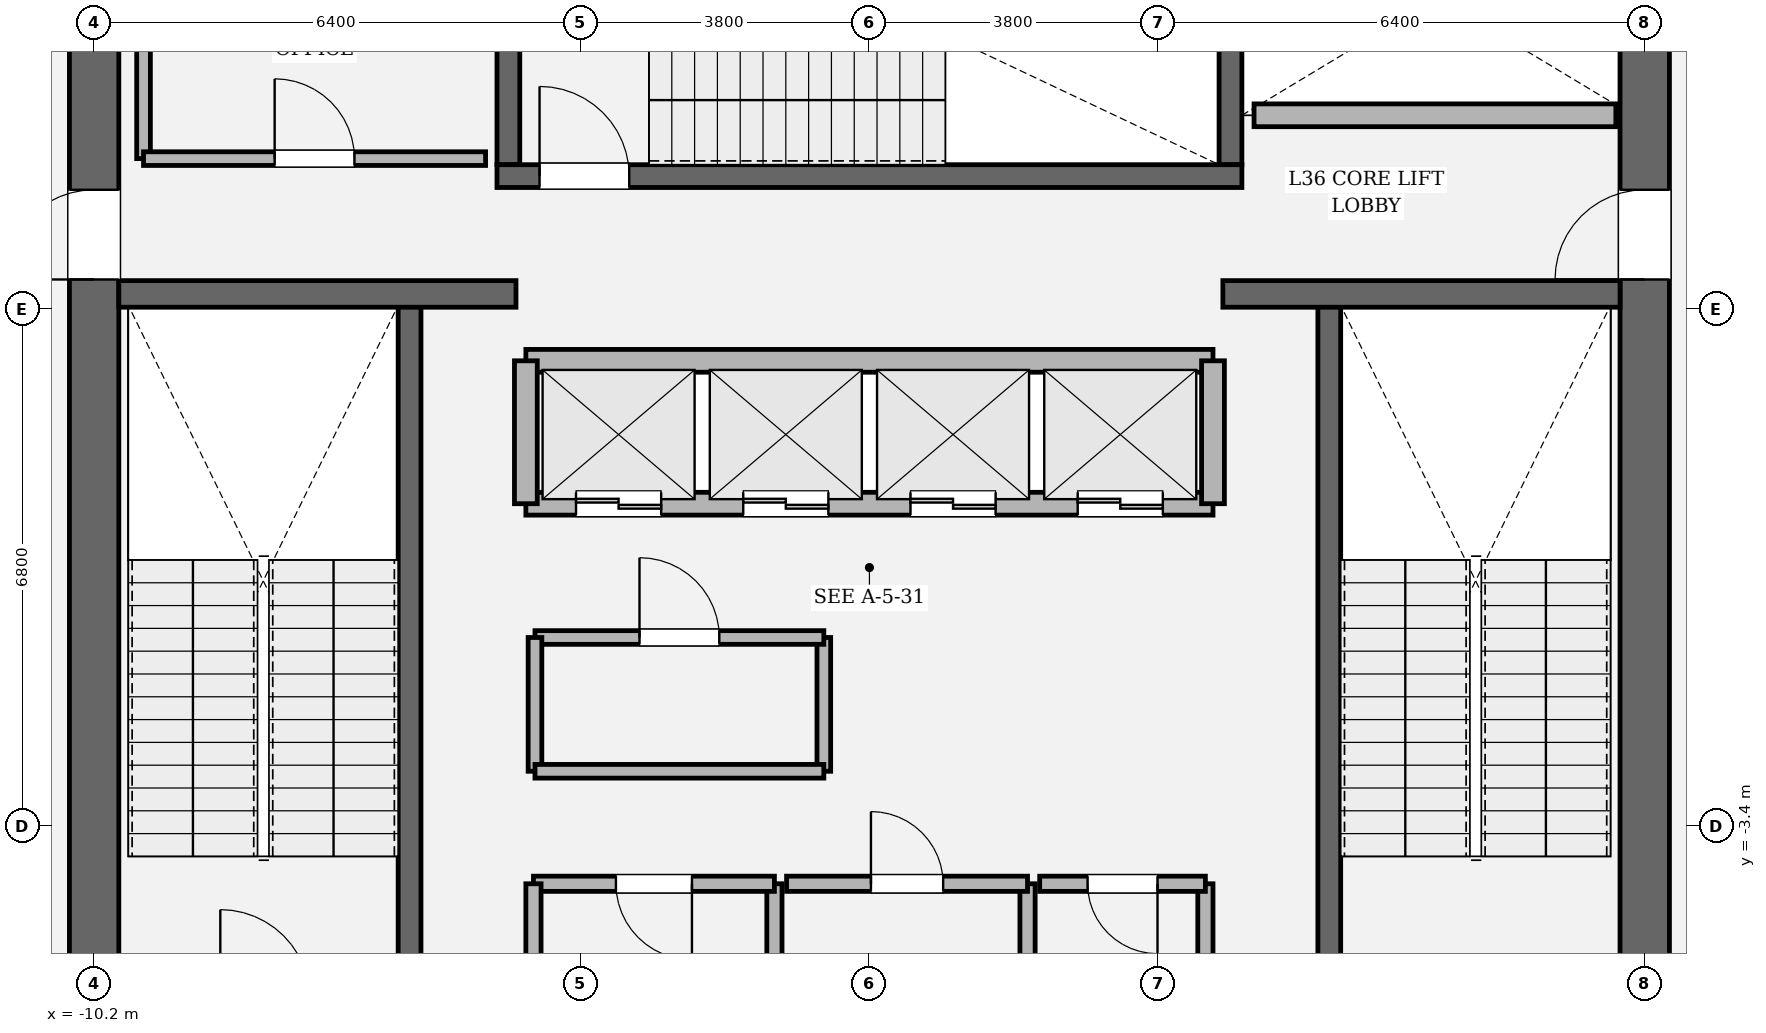
"""IFC4 building model, lengths in metres.
Left out: names, types, materials, properties, quantities, classifications, styles, units other than length and angle.
Written with IfcOpenShell. Run it as: python <this file> out.ifc"""

import sys

from ifc_helpers import new_model, si_unit, direction, frame, frame_2d, origin, place, context, subcontext, project, spatial, rectangle, extrude, element, fill, save


model = new_model("IFC4")
c1 = context("Model", 3, precision=1e-05, world=origin(), true_north=direction((0.0, 1.0)))
c2 = subcontext(c1, "Body", "Model", "MODEL_VIEW")
j1 = project(units=[si_unit("LENGTHUNIT", "METRE"), si_unit("PLANEANGLEUNIT", "RADIAN")], contexts=[c1])
p1 = place(None, origin())
s1 = spatial("IfcSite", under=j1, at=p1, CompositionType="ELEMENT")
p2 = place(p1, origin())
s2 = spatial("IfcBuilding", under=s1, at=p2, CompositionType="ELEMENT")
p3 = place(p2, frame((0.0, 0.0, 156.0)))
s3 = spatial("IfcBuildingStorey", under=s2, at=p3, CompositionType="ELEMENT", Elevation=156.0)
p4 = place(p3, frame((-10.2, -8.875, 0.0), z_axis=(0.0, 0.0, 1.0), x_axis=(0.0, 1.0, 0.0)))
e1 = element("IfcWall", 1, at=p4, inside=s3, PredefinedType="SHEAR", context=c2, shape_type="SweptSolid", body=[
    extrude(rectangle(XDim=17.75, YDim=0.65, at=frame_2d((8.875, 0.0))), origin(), (0.0, 0.0, 1.0), 4.05),
])
p5 = place(p4, frame((12.665, 0.0, 0.0)))
e2 = element("IfcOpeningElement", 2, at=p5, cuts=e1, PredefinedType="OPENING", context=c2, shape_type="SweptSolid", body=[
    extrude(rectangle(XDim=1.18, YDim=2.2, at=frame_2d((0.59, 1.1))), frame((0.0, 0.335, 0.0), z_axis=(0.0, -1.0, 0.0), x_axis=(1.0, 0.0, 0.0)), (0.0, 0.0, 1.0), 0.67),
])
p6 = place(p3, frame((10.2, 8.875, 0.0), z_axis=(0.0, 0.0, 1.0), x_axis=(0.0, -1.0, 0.0)))
e3 = element("IfcWall", 3, at=p6, inside=s3, PredefinedType="SHEAR", context=c2, shape_type="SweptSolid", body=[
    extrude(rectangle(XDim=17.75, YDim=0.65, at=frame_2d((8.875, 0.0))), origin(), (0.0, 0.0, 1.0), 4.05),
])
p7 = place(p6, frame((3.905, 0.0, 0.0)))
e4 = element("IfcOpeningElement", 4, at=p7, cuts=e3, PredefinedType="OPENING", context=c2, shape_type="SweptSolid", body=[
    extrude(rectangle(XDim=1.18, YDim=2.2, at=frame_2d((0.59, 1.1))), frame((0.0, 0.335, 0.0), z_axis=(0.0, -1.0, 0.0), x_axis=(1.0, 0.0, 0.0)), (0.0, 0.0, 1.0), 0.67),
])
for number, where, z_axis, x_axis in (
    (5, (-6.05, -5.5, 0.0), (0.0, 0.0, 1.0), (0.0, 1.0, 0.0)),
    (6, (6.05, 3.45, 0.0), (0.0, 0.0, 1.0), (0.0, -1.0, 0.0)),
):
    element("IfcWall", number, at=place(p3, frame(where, z_axis=z_axis, x_axis=x_axis)), inside=s3, PredefinedType="SOLIDWALL", context=c2, shape_type="SweptSolid", body=[
        extrude(rectangle(XDim=8.95, YDim=0.3, at=frame_2d((4.475, 0.0))), origin(), (0.0, 0.0, 1.0), 4.05),
    ])
for number, where, z_axis, x_axis in (
    (7, (-4.75, 5.3, 0.0), (0.0, 0.0, 1.0), (0.0, 1.0, 0.0)),
    (8, (4.75, 8.875, 0.0), (0.0, 0.0, 1.0), (0.0, -1.0, 0.0)),
):
    element("IfcWall", number, at=place(p3, frame(where, z_axis=z_axis, x_axis=x_axis)), inside=s3, PredefinedType="SOLIDWALL", context=c2, shape_type="SweptSolid", body=[
        extrude(rectangle(XDim=3.575, YDim=0.3, at=frame_2d((1.788, 0.0))), origin(), (0.0, 0.0, 1.0), 4.05),
    ])
p8 = place(p3, frame((-4.9, 5.15, 0.0), z_axis=(0.0, 0.0, 1.0), x_axis=(1.0, 0.0, 0.0)))
e9 = element("IfcWall", 9, at=p8, inside=s3, PredefinedType="SOLIDWALL", context=c2, shape_type="SweptSolid", body=[
    extrude(rectangle(XDim=9.8, YDim=0.3, at=frame_2d((4.9, 0.0))), origin(), (0.0, 0.0, 1.0), 4.05),
])
p9 = place(p8, frame((0.56, 0.0, 0.0)))
e10 = element("IfcOpeningElement", 10, at=p9, cuts=e9, PredefinedType="OPENING", context=c2, shape_type="SweptSolid", body=[
    extrude(rectangle(XDim=1.18, YDim=2.2, at=frame_2d((0.59, 1.1))), frame((0.0, 0.16, 0.0), z_axis=(0.0, -1.0, 0.0), x_axis=(1.0, 0.0, 0.0)), (0.0, 0.0, 1.0), 0.32),
])
for number, where, z_axis, x_axis in (
    (11, (-9.875, 3.6, 0.0), (0.0, 0.0, 1.0), (1.0, 0.0, 0.0)),
    (12, (4.65, 3.6, 0.0), (0.0, 0.0, 1.0), (1.0, 0.0, 0.0)),
):
    element("IfcWall", number, at=place(p3, frame(where, z_axis=z_axis, x_axis=x_axis)), inside=s3, PredefinedType="SOLIDWALL", context=c2, shape_type="SweptSolid", body=[
        extrude(rectangle(XDim=5.225, YDim=0.35, at=frame_2d((2.613, 0.0))), origin(), (0.0, 0.0, 1.0), 4.05),
    ])
p10 = place(p3, frame((-4.52, 0.84, 0.0), z_axis=(0.0, 0.0, 1.0), x_axis=(1.0, 0.0, 0.0)))
e13 = element("IfcWall", 13, at=p10, inside=s3, PredefinedType="SOLIDWALL", context=c2, shape_type="SweptSolid", body=[
    extrude(rectangle(XDim=9.04, YDim=0.3, at=frame_2d((4.52, 0.0))), origin(), (0.0, 0.0, 1.0), 3.83),
])
p11 = place(p10, frame((0.66, 0.0, 0.0)))
e14 = element("IfcOpeningElement", 14, at=p11, cuts=e13, PredefinedType="OPENING", context=c2, shape_type="SweptSolid", body=[
    extrude(rectangle(XDim=1.12, YDim=2.25, at=frame_2d((0.56, 1.125))), frame((0.0, 0.16, 0.0), z_axis=(0.0, -1.0, 0.0), x_axis=(1.0, 0.0, 0.0)), (0.0, 0.0, 1.0), 0.32),
])
p12 = place(p10, frame((2.86, 0.0, 0.0)))
e15 = element("IfcOpeningElement", 15, at=p12, cuts=e13, PredefinedType="OPENING", context=c2, shape_type="SweptSolid", body=[
    extrude(rectangle(XDim=1.12, YDim=2.25, at=frame_2d((0.56, 1.125))), frame((0.0, 0.16, 0.0), z_axis=(0.0, -1.0, 0.0), x_axis=(1.0, 0.0, 0.0)), (0.0, 0.0, 1.0), 0.32),
])
p13 = place(p10, frame((5.06, 0.0, 0.0)))
e16 = element("IfcOpeningElement", 16, at=p13, cuts=e13, PredefinedType="OPENING", context=c2, shape_type="SweptSolid", body=[
    extrude(rectangle(XDim=1.12, YDim=2.25, at=frame_2d((0.56, 1.125))), frame((0.0, 0.16, 0.0), z_axis=(0.0, -1.0, 0.0), x_axis=(1.0, 0.0, 0.0)), (0.0, 0.0, 1.0), 0.32),
])
p14 = place(p10, frame((7.26, 0.0, 0.0)))
e17 = element("IfcOpeningElement", 17, at=p14, cuts=e13, PredefinedType="OPENING", context=c2, shape_type="SweptSolid", body=[
    extrude(rectangle(XDim=1.12, YDim=2.25, at=frame_2d((0.56, 1.125))), frame((0.0, 0.16, 0.0), z_axis=(0.0, -1.0, 0.0), x_axis=(1.0, 0.0, 0.0)), (0.0, 0.0, 1.0), 0.32),
])
p15 = place(p3, frame((-4.52, 2.72, 0.0), z_axis=(0.0, 0.0, 1.0), x_axis=(1.0, 0.0, 0.0)))
e18 = element("IfcWall", 18, at=p15, inside=s3, PredefinedType="SOLIDWALL", context=c2, shape_type="SweptSolid", body=[
    extrude(rectangle(XDim=9.04, YDim=0.3, at=frame_2d((4.52, 0.0))), origin(), (0.0, 0.0, 1.0), 3.83),
])
for number, where, z_axis, x_axis in (
    (19, (-4.52, 0.84, 0.0), (0.0, 0.0, 1.0), (0.0, 1.0, 0.0)),
    (20, (4.52, 0.84, 0.0), (0.0, 0.0, 1.0), (0.0, 1.0, 0.0)),
):
    element("IfcWall", number, at=place(p3, frame(where, z_axis=z_axis, x_axis=x_axis)), inside=s3, PredefinedType="SOLIDWALL", context=c2, shape_type="SweptSolid", body=[
        extrude(rectangle(XDim=1.88, YDim=0.3, at=frame_2d((0.94, 0.0))), origin(), (0.0, 0.0, 1.0), 3.83),
    ])
p16 = place(p3, frame((5.06, 5.95, 0.0), z_axis=(0.0, 0.0, 1.0), x_axis=(1.0, 0.0, 0.0)))
e21 = element("IfcWall", 21, at=p16, inside=s3, PredefinedType="SOLIDWALL", context=c2, shape_type="SweptSolid", body=[
    extrude(rectangle(XDim=4.76, YDim=0.3, at=frame_2d((2.38, 0.0))), origin(), (0.0, 0.0, 1.0), 3.83),
])
p17 = place(p3, frame((-1.25, -5.9, 0.0), z_axis=(0.0, 0.0, 1.0), x_axis=(0.0, 1.0, 0.0)))
e22 = element("IfcWall", 22, at=p17, inside=s3, PredefinedType="SOLIDWALL", context=c2, shape_type="SweptSolid", body=[
    extrude(rectangle(XDim=1.74, YDim=0.2, at=frame_2d((0.87, 0.0))), origin(), (0.0, 0.0, 1.0), 3.83),
])
p18 = place(p3, frame((-1.25, -4.16, 0.0), z_axis=(0.0, 0.0, 1.0), x_axis=(-1.0, 0.0, 0.0)))
e23 = element("IfcWall", 23, at=p18, inside=s3, PredefinedType="SOLIDWALL", context=c2, shape_type="SweptSolid", body=[
    extrude(rectangle(XDim=3.17, YDim=0.2, at=frame_2d((1.585, 0.0))), origin(), (0.0, 0.0, 1.0), 3.83),
])
p19 = place(p18, frame((1.085, 0.0, 0.0)))
e24 = element("IfcOpeningElement", 24, at=p19, cuts=e23, PredefinedType="OPENING", context=c2, shape_type="SweptSolid", body=[
    extrude(rectangle(XDim=1.0, YDim=2.15, at=frame_2d((0.5, 1.075))), frame((0.0, 0.11, 0.0), z_axis=(0.0, -1.0, 0.0), x_axis=(1.0, 0.0, 0.0)), (0.0, 0.0, 1.0), 0.22),
])
for number, where, z_axis, x_axis in (
    (25, (-4.42, -4.16, 0.0), (0.0, 0.0, 1.0), (0.0, -1.0, 0.0)),
    (26, (2.08, -5.9, 0.0), (0.0, 0.0, 1.0), (0.0, 1.0, 0.0)),
):
    element("IfcWall", number, at=place(p3, frame(where, z_axis=z_axis, x_axis=x_axis)), inside=s3, PredefinedType="SOLIDWALL", context=c2, shape_type="SweptSolid", body=[
        extrude(rectangle(XDim=1.74, YDim=0.2, at=frame_2d((0.87, 0.0))), origin(), (0.0, 0.0, 1.0), 3.83),
    ])
p20 = place(p3, frame((2.08, -4.16, 0.0), z_axis=(0.0, 0.0, 1.0), x_axis=(-1.0, 0.0, 0.0)))
e27 = element("IfcWall", 27, at=p20, inside=s3, PredefinedType="SOLIDWALL", context=c2, shape_type="SweptSolid", body=[
    extrude(rectangle(XDim=3.17, YDim=0.2, at=frame_2d((1.585, 0.0))), origin(), (0.0, 0.0, 1.0), 3.83),
])
p21 = place(p20, frame((1.11, 0.0, 0.0)))
e28 = element("IfcOpeningElement", 28, at=p21, cuts=e27, PredefinedType="OPENING", context=c2, shape_type="SweptSolid", body=[
    extrude(rectangle(XDim=0.95, YDim=2.15, at=frame_2d((0.475, 1.075))), frame((0.0, 0.11, 0.0), z_axis=(0.0, -1.0, 0.0), x_axis=(1.0, 0.0, 0.0)), (0.0, 0.0, 1.0), 0.22),
])
p22 = place(p3, frame((4.42, -5.9, 0.0), z_axis=(0.0, 0.0, 1.0), x_axis=(0.0, 1.0, 0.0)))
e29 = element("IfcWall", 29, at=p22, inside=s3, PredefinedType="SOLIDWALL", context=c2, shape_type="SweptSolid", body=[
    extrude(rectangle(XDim=1.74, YDim=0.2, at=frame_2d((0.87, 0.0))), origin(), (0.0, 0.0, 1.0), 3.83),
])
p23 = place(p3, frame((4.42, -4.16, 0.0), z_axis=(0.0, 0.0, 1.0), x_axis=(-1.0, 0.0, 0.0)))
e30 = element("IfcWall", 30, at=p23, inside=s3, PredefinedType="SOLIDWALL", context=c2, shape_type="SweptSolid", body=[
    extrude(rectangle(XDim=2.18, YDim=0.2, at=frame_2d((1.09, 0.0))), origin(), (0.0, 0.0, 1.0), 3.83),
])
p24 = place(p23, frame((0.63, 0.0, 0.0)))
e31 = element("IfcOpeningElement", 31, at=p24, cuts=e30, PredefinedType="OPENING", context=c2, shape_type="SweptSolid", body=[
    extrude(rectangle(XDim=0.92, YDim=2.1, at=frame_2d((0.46, 1.05))), frame((0.0, 0.11, 0.0), z_axis=(0.0, -1.0, 0.0), x_axis=(1.0, 0.0, 0.0)), (0.0, 0.0, 1.0), 0.22),
])
p25 = place(p3, frame((-0.6, -2.68, 0.0), z_axis=(0.0, 0.0, 1.0), x_axis=(0.0, 1.0, 0.0)))
e32 = element("IfcWall", 32, at=p25, inside=s3, PredefinedType="PARTITIONING", context=c2, shape_type="SweptSolid", body=[
    extrude(rectangle(XDim=1.76, YDim=0.18, at=frame_2d((0.88, 0.0))), origin(), (0.0, 0.0, 1.0), 3.83),
])
p26 = place(p3, frame((-0.6, -0.92, 0.0), z_axis=(0.0, 0.0, 1.0), x_axis=(-1.0, 0.0, 0.0)))
e33 = element("IfcWall", 33, at=p26, inside=s3, PredefinedType="PARTITIONING", context=c2, shape_type="SweptSolid", body=[
    extrude(rectangle(XDim=3.8, YDim=0.18, at=frame_2d((1.9, 0.0))), origin(), (0.0, 0.0, 1.0), 3.83),
])
p27 = place(p26, frame((1.375, 0.0, 0.0)))
e34 = element("IfcOpeningElement", 34, at=p27, cuts=e33, PredefinedType="OPENING", context=c2, shape_type="SweptSolid", body=[
    extrude(rectangle(XDim=1.05, YDim=2.2, at=frame_2d((0.525, 1.1))), frame((0.0, 0.1, 0.0), z_axis=(0.0, -1.0, 0.0), x_axis=(1.0, 0.0, 0.0)), (0.0, 0.0, 1.0), 0.2),
])
p28 = place(p3, frame((-4.4, -0.92, 0.0), z_axis=(0.0, 0.0, 1.0), x_axis=(0.0, -1.0, 0.0)))
e35 = element("IfcWall", 35, at=p28, inside=s3, PredefinedType="PARTITIONING", context=c2, shape_type="SweptSolid", body=[
    extrude(rectangle(XDim=1.76, YDim=0.18, at=frame_2d((0.88, 0.0))), origin(), (0.0, 0.0, 1.0), 3.83),
])
p29 = place(p3, frame((-4.4, -2.68, 0.0), z_axis=(0.0, 0.0, 1.0), x_axis=(1.0, 0.0, 0.0)))
e36 = element("IfcWall", 36, at=p29, inside=s3, PredefinedType="PARTITIONING", context=c2, shape_type="SweptSolid", body=[
    extrude(rectangle(XDim=3.8, YDim=0.18, at=frame_2d((1.9, 0.0))), origin(), (0.0, 0.0, 1.0), 3.83),
])
p30 = place(p3, frame((-9.55, 8.65, 0.0), z_axis=(0.0, 0.0, 1.0), x_axis=(0.0, -1.0, 0.0)))
e37 = element("IfcWall", 37, at=p30, inside=s3, PredefinedType="PARTITIONING", context=c2, shape_type="SweptSolid", body=[
    extrude(rectangle(XDim=3.27, YDim=0.18, at=frame_2d((1.635, 0.0))), origin(), (0.0, 0.0, 1.0), 3.83),
])
p31 = place(p3, frame((-9.55, 5.38, 0.0), z_axis=(0.0, 0.0, 1.0), x_axis=(1.0, 0.0, 0.0)))
e38 = element("IfcWall", 38, at=p31, inside=s3, PredefinedType="PARTITIONING", context=c2, shape_type="SweptSolid", body=[
    extrude(rectangle(XDim=4.5, YDim=0.18, at=frame_2d((2.25, 0.0))), origin(), (0.0, 0.0, 1.0), 3.83),
])
p32 = place(p31, frame((1.725, 0.0, 0.0)))
e39 = element("IfcOpeningElement", 39, at=p32, cuts=e38, PredefinedType="OPENING", context=c2, shape_type="SweptSolid", body=[
    extrude(rectangle(XDim=1.05, YDim=2.2, at=frame_2d((0.525, 1.1))), frame((0.0, 0.1, 0.0), z_axis=(0.0, -1.0, 0.0), x_axis=(1.0, 0.0, 0.0)), (0.0, 0.0, 1.0), 0.2),
])
p33 = place(p9, origin())
e40 = element("IfcDoor", 40, at=p33, inside=s3, OperationType="SINGLE_SWING_LEFT", PredefinedType="DOOR", context=c2, shape_type="SweptSolid", body=[
    extrude(rectangle(XDim=1.18, YDim=2.2, at=frame_2d((0.59, 1.1))), frame((0.0, 0.025, 0.0), z_axis=(0.0, -1.0, 0.0), x_axis=(1.0, 0.0, 0.0)), (0.0, 0.0, 1.0), 0.05),
])
fill(e10, e40)
p34 = place(p5, origin())
e41 = element("IfcDoor", 41, at=p34, inside=s3, OperationType="SINGLE_SWING_LEFT", PredefinedType="DOOR", context=c2, shape_type="SweptSolid", body=[
    extrude(rectangle(XDim=1.18, YDim=2.2, at=frame_2d((0.59, 1.1))), frame((0.0, 0.025, 0.0), z_axis=(0.0, -1.0, 0.0), x_axis=(1.0, 0.0, 0.0)), (0.0, 0.0, 1.0), 0.05),
])
fill(e2, e41)
p35 = place(p7, origin())
e42 = element("IfcDoor", 42, at=p35, inside=s3, OperationType="SINGLE_SWING_RIGHT", PredefinedType="DOOR", context=c2, shape_type="SweptSolid", body=[
    extrude(rectangle(XDim=1.18, YDim=2.2, at=frame_2d((0.59, 1.1))), frame((0.0, 0.025, 0.0), z_axis=(0.0, -1.0, 0.0), x_axis=(1.0, 0.0, 0.0)), (0.0, 0.0, 1.0), 0.05),
])
fill(e4, e42)
p36 = place(p11, origin())
e43 = element("IfcDoor", 43, at=p36, inside=s3, OperationType="DOUBLE_DOOR_SLIDING", PredefinedType="DOOR", context=c2, shape_type="SweptSolid", body=[
    extrude(rectangle(XDim=1.12, YDim=2.25, at=frame_2d((0.56, 1.125))), frame((0.0, 0.025, 0.0), z_axis=(0.0, -1.0, 0.0), x_axis=(1.0, 0.0, 0.0)), (0.0, 0.0, 1.0), 0.05),
])
fill(e14, e43)
p37 = place(p12, origin())
e44 = element("IfcDoor", 44, at=p37, inside=s3, OperationType="DOUBLE_DOOR_SLIDING", PredefinedType="DOOR", context=c2, shape_type="SweptSolid", body=[
    extrude(rectangle(XDim=1.12, YDim=2.25, at=frame_2d((0.56, 1.125))), frame((0.0, 0.025, 0.0), z_axis=(0.0, -1.0, 0.0), x_axis=(1.0, 0.0, 0.0)), (0.0, 0.0, 1.0), 0.05),
])
fill(e15, e44)
p38 = place(p13, origin())
e45 = element("IfcDoor", 45, at=p38, inside=s3, OperationType="DOUBLE_DOOR_SLIDING", PredefinedType="DOOR", context=c2, shape_type="SweptSolid", body=[
    extrude(rectangle(XDim=1.12, YDim=2.25, at=frame_2d((0.56, 1.125))), frame((0.0, 0.025, 0.0), z_axis=(0.0, -1.0, 0.0), x_axis=(1.0, 0.0, 0.0)), (0.0, 0.0, 1.0), 0.05),
])
fill(e16, e45)
p39 = place(p14, origin())
e46 = element("IfcDoor", 46, at=p39, inside=s3, OperationType="DOUBLE_DOOR_SLIDING", PredefinedType="DOOR", context=c2, shape_type="SweptSolid", body=[
    extrude(rectangle(XDim=1.12, YDim=2.25, at=frame_2d((0.56, 1.125))), frame((0.0, 0.025, 0.0), z_axis=(0.0, -1.0, 0.0), x_axis=(1.0, 0.0, 0.0)), (0.0, 0.0, 1.0), 0.05),
])
fill(e17, e46)
p40 = place(p19, origin())
e47 = element("IfcDoor", 47, at=p40, inside=s3, OperationType="SINGLE_SWING_LEFT", PredefinedType="DOOR", context=c2, shape_type="SweptSolid", body=[
    extrude(rectangle(XDim=1.0, YDim=2.15, at=frame_2d((0.5, 1.075))), frame((0.0, 0.025, 0.0), z_axis=(0.0, -1.0, 0.0), x_axis=(1.0, 0.0, 0.0)), (0.0, 0.0, 1.0), 0.05),
])
fill(e24, e47)
p41 = place(p21, origin())
e48 = element("IfcDoor", 48, at=p41, inside=s3, OperationType="SINGLE_SWING_RIGHT", PredefinedType="DOOR", context=c2, shape_type="SweptSolid", body=[
    extrude(rectangle(XDim=0.95, YDim=2.15, at=frame_2d((0.475, 1.075))), frame((0.0, 0.025, 0.0), z_axis=(0.0, -1.0, 0.0), x_axis=(1.0, 0.0, 0.0)), (0.0, 0.0, 1.0), 0.05),
])
fill(e28, e48)
p42 = place(p24, origin())
e49 = element("IfcDoor", 49, at=p42, inside=s3, OperationType="SINGLE_SWING_LEFT", PredefinedType="DOOR", context=c2, shape_type="SweptSolid", body=[
    extrude(rectangle(XDim=0.92, YDim=2.1, at=frame_2d((0.46, 1.05))), frame((0.0, 0.025, 0.0), z_axis=(0.0, -1.0, 0.0), x_axis=(1.0, 0.0, 0.0)), (0.0, 0.0, 1.0), 0.05),
])
fill(e31, e49)
p43 = place(p27, origin())
e50 = element("IfcDoor", 50, at=p43, inside=s3, OperationType="SINGLE_SWING_RIGHT", PredefinedType="DOOR", context=c2, shape_type="SweptSolid", body=[
    extrude(rectangle(XDim=1.05, YDim=2.2, at=frame_2d((0.525, 1.1))), frame((0.0, 0.025, 0.0), z_axis=(0.0, -1.0, 0.0), x_axis=(1.0, 0.0, 0.0)), (0.0, 0.0, 1.0), 0.05),
])
fill(e34, e50)
p44 = place(p32, origin())
e51 = element("IfcDoor", 51, at=p44, inside=s3, OperationType="SINGLE_SWING_LEFT", PredefinedType="DOOR", context=c2, shape_type="SweptSolid", body=[
    extrude(rectangle(XDim=1.05, YDim=2.2, at=frame_2d((0.525, 1.1))), frame((0.0, 0.025, 0.0), z_axis=(0.0, -1.0, 0.0), x_axis=(1.0, 0.0, 0.0)), (0.0, 0.0, 1.0), 0.05),
])
fill(e39, e51)
save(model, sys.argv[1])
